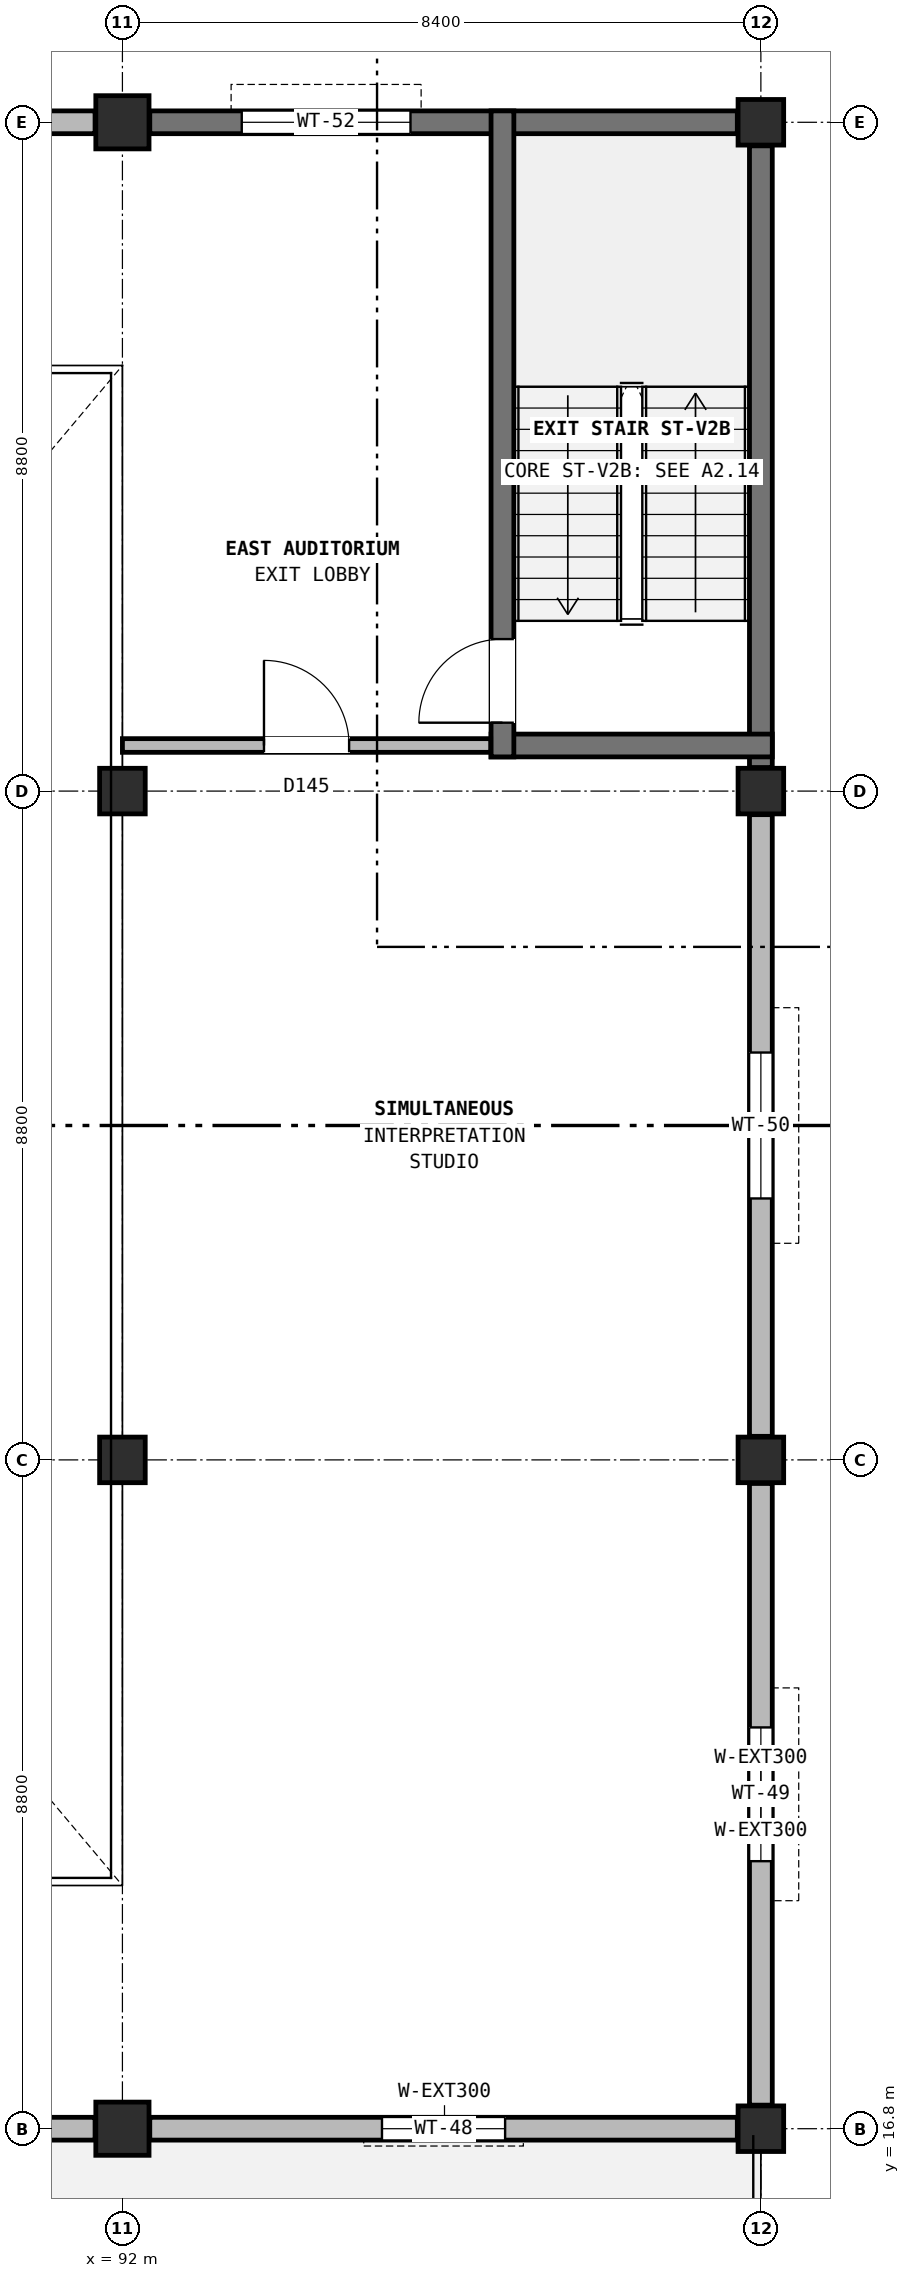
"""IFC4 building model, lengths in metres.
Left out: names, types, materials, properties, quantities, classifications, styles, units other than length and angle.
Written with IfcOpenShell. Run it as: python <this file> out.ifc"""

import sys

from ifc_helpers import new_model, si_unit, direction, frame, frame_2d, origin, origin_2d, place, context, subcontext, project, spatial, rectangle, extrude, element, fill, save


model = new_model("IFC4")
c1 = context("Model", 3, precision=1e-05, world=origin(), true_north=direction((0.0, 1.0)))
c2 = subcontext(c1, "Body", "Model", "MODEL_VIEW")
j1 = project(units=[si_unit("LENGTHUNIT", "METRE"), si_unit("PLANEANGLEUNIT", "RADIAN")], contexts=[c1])
p1 = place(None, origin())
s1 = spatial("IfcSite", under=j1, at=p1, CompositionType="ELEMENT")
p2 = place(p1, origin())
s2 = spatial("IfcBuilding", under=s1, at=p2, CompositionType="ELEMENT")
p3 = place(p2, frame((0.0, 0.0, 4.8)))
s3 = spatial("IfcBuildingStorey", under=s2, at=p3, CompositionType="ELEMENT", Elevation=4.8)
p4 = place(p3, frame((92.0, 16.8, 0.0), z_axis=(0.0, 0.0, 1.0), x_axis=(1.0, 0.0, 0.0)))
e1 = element("IfcColumn", 1, at=p4, inside=s3, PredefinedType="COLUMN", context=c2, shape_type="SweptSolid", body=[
    extrude(rectangle(XDim=0.7, YDim=0.7, at=origin_2d()), origin(), (0.0, 0.0, 1.0), 4.2),
])
for number, where, z_axis, x_axis in (
    (2, (92.0, 25.6, 0.0), (0.0, 0.0, 1.0), (1.0, 0.0, 0.0)),
    (3, (92.0, 34.4, 0.0), (0.0, 0.0, 1.0), (1.0, 0.0, 0.0)),
):
    element("IfcColumn", number, at=place(p3, frame(where, z_axis=z_axis, x_axis=x_axis)), inside=s3, PredefinedType="COLUMN", context=c2, shape_type="SweptSolid", body=[
        extrude(rectangle(XDim=0.6, YDim=0.6, at=origin_2d()), origin(), (0.0, 0.0, 1.0), 4.2),
    ])
p5 = place(p3, frame((92.0, 43.2, 0.0), z_axis=(0.0, 0.0, 1.0), x_axis=(1.0, 0.0, 0.0)))
e4 = element("IfcColumn", 4, at=p5, inside=s3, PredefinedType="COLUMN", context=c2, shape_type="SweptSolid", body=[
    extrude(rectangle(XDim=0.7, YDim=0.7, at=origin_2d()), origin(), (0.0, 0.0, 1.0), 4.2),
])
for number, where, z_axis, x_axis in (
    (5, (100.4, 16.8, 0.0), (0.0, 0.0, 1.0), (1.0, 0.0, 0.0)),
    (6, (100.4, 25.6, 0.0), (0.0, 0.0, 1.0), (1.0, 0.0, 0.0)),
    (7, (100.4, 34.4, 0.0), (0.0, 0.0, 1.0), (1.0, 0.0, 0.0)),
    (8, (100.4, 43.2, 0.0), (0.0, 0.0, 1.0), (1.0, 0.0, 0.0)),
):
    element("IfcColumn", number, at=place(p3, frame(where, z_axis=z_axis, x_axis=x_axis)), inside=s3, PredefinedType="COLUMN", context=c2, shape_type="SweptSolid", body=[
        extrude(rectangle(XDim=0.6, YDim=0.6, at=origin_2d()), origin(), (0.0, 0.0, 1.0), 4.2),
    ])
p6 = place(p3, frame((83.96, 16.8, 0.0), z_axis=(0.0, 0.0, 1.0), x_axis=(1.0, 0.0, 0.0)))
e9 = element("IfcWall", 9, at=p6, inside=s3, PredefinedType="SOLIDWALL", context=c2, shape_type="SweptSolid", body=[
    extrude(rectangle(XDim=7.68, YDim=0.3, at=frame_2d((3.84, 0.0))), origin(), (0.0, 0.0, 1.0), 3.45),
])
p7 = place(p3, frame((92.36, 16.8, 0.0), z_axis=(0.0, 0.0, 1.0), x_axis=(1.0, 0.0, 0.0)))
e10 = element("IfcWall", 10, at=p7, inside=s3, PredefinedType="SOLIDWALL", context=c2, shape_type="SweptSolid", body=[
    extrude(rectangle(XDim=7.73, YDim=0.3, at=frame_2d((3.865, 0.0))), origin(), (0.0, 0.0, 1.0), 3.45),
])
p8 = place(p7, frame((3.055, 0.0, 0.9)))
e11 = element("IfcOpeningElement", 11, at=p8, cuts=e10, PredefinedType="OPENING", context=c2, shape_type="SweptSolid", body=[
    extrude(rectangle(XDim=1.62, YDim=1.88, at=frame_2d((0.81, 0.94))), frame((0.0, 0.16, 0.0), z_axis=(0.0, -1.0, 0.0), x_axis=(1.0, 0.0, 0.0)), (0.0, 0.0, 1.0), 0.32),
])
p9 = place(p3, frame((100.4, 17.11, 0.0), z_axis=(0.0, 0.0, 1.0), x_axis=(0.0, 1.0, 0.0)))
e12 = element("IfcWall", 12, at=p9, inside=s3, PredefinedType="SOLIDWALL", context=c2, shape_type="SweptSolid", body=[
    extrude(rectangle(XDim=8.18, YDim=0.3, at=frame_2d((4.09, 0.0))), origin(), (0.0, 0.0, 1.0), 3.45),
])
p10 = place(p9, frame((3.21, 0.0, 0.9)))
e13 = element("IfcOpeningElement", 13, at=p10, cuts=e12, PredefinedType="OPENING", context=c2, shape_type="SweptSolid", body=[
    extrude(rectangle(XDim=1.76, YDim=1.94, at=frame_2d((0.88, 0.97))), frame((0.0, 0.16, 0.0), z_axis=(0.0, -1.0, 0.0), x_axis=(1.0, 0.0, 0.0)), (0.0, 0.0, 1.0), 0.32),
])
p11 = place(p3, frame((100.4, 25.91, 0.0), z_axis=(0.0, 0.0, 1.0), x_axis=(0.0, 1.0, 0.0)))
e14 = element("IfcWall", 14, at=p11, inside=s3, PredefinedType="SOLIDWALL", context=c2, shape_type="SweptSolid", body=[
    extrude(rectangle(XDim=8.18, YDim=0.3, at=frame_2d((4.09, 0.0))), origin(), (0.0, 0.0, 1.0), 3.45),
])
p12 = place(p11, frame((3.13, 0.0, 0.9)))
e15 = element("IfcOpeningElement", 15, at=p12, cuts=e14, PredefinedType="OPENING", context=c2, shape_type="SweptSolid", body=[
    extrude(rectangle(XDim=1.92, YDim=1.98, at=frame_2d((0.96, 0.99))), frame((0.0, 0.16, 0.0), z_axis=(0.0, -1.0, 0.0), x_axis=(1.0, 0.0, 0.0)), (0.0, 0.0, 1.0), 0.32),
])
p13 = place(p3, frame((100.4, 34.71, 0.0), z_axis=(0.0, 0.0, 1.0), x_axis=(0.0, 1.0, 0.0)))
e16 = element("IfcWall", 16, at=p13, inside=s3, PredefinedType="SHEAR", context=c2, shape_type="SweptSolid", body=[
    extrude(rectangle(XDim=8.18, YDim=0.3, at=frame_2d((4.09, 0.0))), origin(), (0.0, 0.0, 1.0), 3.45),
])
p14 = place(p3, frame((100.09, 43.2, 0.0), z_axis=(0.0, 0.0, 1.0), x_axis=(-1.0, 0.0, 0.0)))
e17 = element("IfcWall", 17, at=p14, inside=s3, PredefinedType="SHEAR", context=c2, shape_type="SweptSolid", body=[
    extrude(rectangle(XDim=7.73, YDim=0.3, at=frame_2d((3.865, 0.0))), origin(), (0.0, 0.0, 1.0), 3.45),
])
p15 = place(p14, frame((4.3, 0.0, 0.9)))
e18 = element("IfcOpeningElement", 18, at=p15, cuts=e17, PredefinedType="OPENING", context=c2, shape_type="SweptSolid", body=[
    extrude(rectangle(XDim=2.22, YDim=2.08, at=frame_2d((1.11, 1.04))), frame((0.0, 0.16, 0.0), z_axis=(0.0, -1.0, 0.0), x_axis=(1.0, 0.0, 0.0)), (0.0, 0.0, 1.0), 0.32),
])
p16 = place(p3, frame((91.64, 43.2, 0.0), z_axis=(0.0, 0.0, 1.0), x_axis=(-1.0, 0.0, 0.0)))
e19 = element("IfcWall", 19, at=p16, inside=s3, PredefinedType="SOLIDWALL", context=c2, shape_type="SweptSolid", body=[
    extrude(rectangle(XDim=7.68, YDim=0.3, at=frame_2d((3.84, 0.0))), origin(), (0.0, 0.0, 1.0), 3.45),
])
p17 = place(p3, frame((96.85, 35.0, 0.0), z_axis=(0.0, 0.0, 1.0), x_axis=(1.0, 0.0, 0.0)))
e20 = element("IfcWall", 20, at=p17, inside=s3, PredefinedType="SHEAR", context=c2, shape_type="SweptSolid", body=[
    extrude(rectangle(XDim=3.7, YDim=0.3, at=frame_2d((1.85, 0.0))), origin(), (0.0, 0.0, 1.0), 4.2),
])
p18 = place(p3, frame((97.0, 34.85, 0.0), z_axis=(0.0, 0.0, 1.0), x_axis=(0.0, 1.0, 0.0)))
e21 = element("IfcWall", 21, at=p18, inside=s3, PredefinedType="SHEAR", context=c2, shape_type="SweptSolid", body=[
    extrude(rectangle(XDim=8.5, YDim=0.3, at=frame_2d((4.25, 0.0))), origin(), (0.0, 0.0, 1.0), 4.2),
])
p19 = place(p18, frame((0.45, 0.0, 0.0)))
e22 = element("IfcOpeningElement", 22, at=p19, cuts=e21, PredefinedType="OPENING", context=c2, shape_type="SweptSolid", body=[
    extrude(rectangle(XDim=1.1, YDim=2.2, at=frame_2d((0.55, 1.1))), frame((0.0, 0.16, 0.0), z_axis=(0.0, -1.0, 0.0), x_axis=(1.0, 0.0, 0.0)), (0.0, 0.0, 1.0), 0.32),
])
p20 = place(p3, frame((92.0, 35.0, 0.0), z_axis=(0.0, 0.0, 1.0), x_axis=(1.0, 0.0, 0.0)))
e23 = element("IfcWall", 23, at=p20, inside=s3, PredefinedType="PARTITIONING", context=c2, shape_type="SweptSolid", body=[
    extrude(rectangle(XDim=4.845, YDim=0.18, at=frame_2d((2.422, 0.0))), origin(), (0.0, 0.0, 1.0), 3.865),
])
p21 = place(p20, frame((1.863, 0.0, 0.0)))
e24 = element("IfcOpeningElement", 24, at=p21, cuts=e23, PredefinedType="OPENING", context=c2, shape_type="SweptSolid", body=[
    extrude(rectangle(XDim=1.12, YDim=2.22, at=frame_2d((0.56, 1.11))), frame((0.0, 0.1, 0.0), z_axis=(0.0, -1.0, 0.0), x_axis=(1.0, 0.0, 0.0)), (0.0, 0.0, 1.0), 0.2),
])
p22 = place(p8, origin())
e25 = element("IfcWindow", 25, at=p22, inside=s3, PartitioningType="SINGLE_PANEL", PredefinedType="WINDOW", context=c2, shape_type="SweptSolid", body=[
    extrude(rectangle(XDim=1.62, YDim=1.88, at=frame_2d((0.81, 0.94))), frame((0.0, 0.03, 0.0), z_axis=(0.0, -1.0, 0.0), x_axis=(1.0, 0.0, 0.0)), (0.0, 0.0, 1.0), 0.06),
])
fill(e11, e25)
p23 = place(p10, origin())
e26 = element("IfcWindow", 26, at=p23, inside=s3, PartitioningType="SINGLE_PANEL", PredefinedType="WINDOW", context=c2, shape_type="SweptSolid", body=[
    extrude(rectangle(XDim=1.76, YDim=1.94, at=frame_2d((0.88, 0.97))), frame((0.0, 0.03, 0.0), z_axis=(0.0, -1.0, 0.0), x_axis=(1.0, 0.0, 0.0)), (0.0, 0.0, 1.0), 0.06),
])
fill(e13, e26)
p24 = place(p12, origin())
e27 = element("IfcWindow", 27, at=p24, inside=s3, PartitioningType="SINGLE_PANEL", PredefinedType="WINDOW", context=c2, shape_type="SweptSolid", body=[
    extrude(rectangle(XDim=1.92, YDim=1.98, at=frame_2d((0.96, 0.99))), frame((0.0, 0.03, 0.0), z_axis=(0.0, -1.0, 0.0), x_axis=(1.0, 0.0, 0.0)), (0.0, 0.0, 1.0), 0.06),
])
fill(e15, e27)
p25 = place(p15, origin())
e28 = element("IfcWindow", 28, at=p25, inside=s3, PartitioningType="SINGLE_PANEL", PredefinedType="WINDOW", context=c2, shape_type="SweptSolid", body=[
    extrude(rectangle(XDim=2.22, YDim=2.08, at=frame_2d((1.11, 1.04))), frame((0.0, 0.03, 0.0), z_axis=(0.0, -1.0, 0.0), x_axis=(1.0, 0.0, 0.0)), (0.0, 0.0, 1.0), 0.06),
])
fill(e18, e28)
p26 = place(p19, origin())
e29 = element("IfcDoor", 29, at=p26, inside=s3, OperationType="SINGLE_SWING_LEFT", PredefinedType="DOOR", context=c2, shape_type="SweptSolid", body=[
    extrude(rectangle(XDim=1.1, YDim=2.2, at=frame_2d((0.55, 1.1))), frame((0.0, 0.025, 0.0), z_axis=(0.0, -1.0, 0.0), x_axis=(1.0, 0.0, 0.0)), (0.0, 0.0, 1.0), 0.05),
])
fill(e22, e29)
p27 = place(p21, origin())
e30 = element("IfcDoor", 30, at=p27, inside=s3, OperationType="SINGLE_SWING_LEFT", PredefinedType="DOOR", context=c2, shape_type="SweptSolid", body=[
    extrude(rectangle(XDim=1.12, YDim=2.22, at=frame_2d((0.56, 1.11))), frame((0.0, 0.025, 0.0), z_axis=(0.0, -1.0, 0.0), x_axis=(1.0, 0.0, 0.0)), (0.0, 0.0, 1.0), 0.05),
])
fill(e24, e30)
save(model, sys.argv[1])
